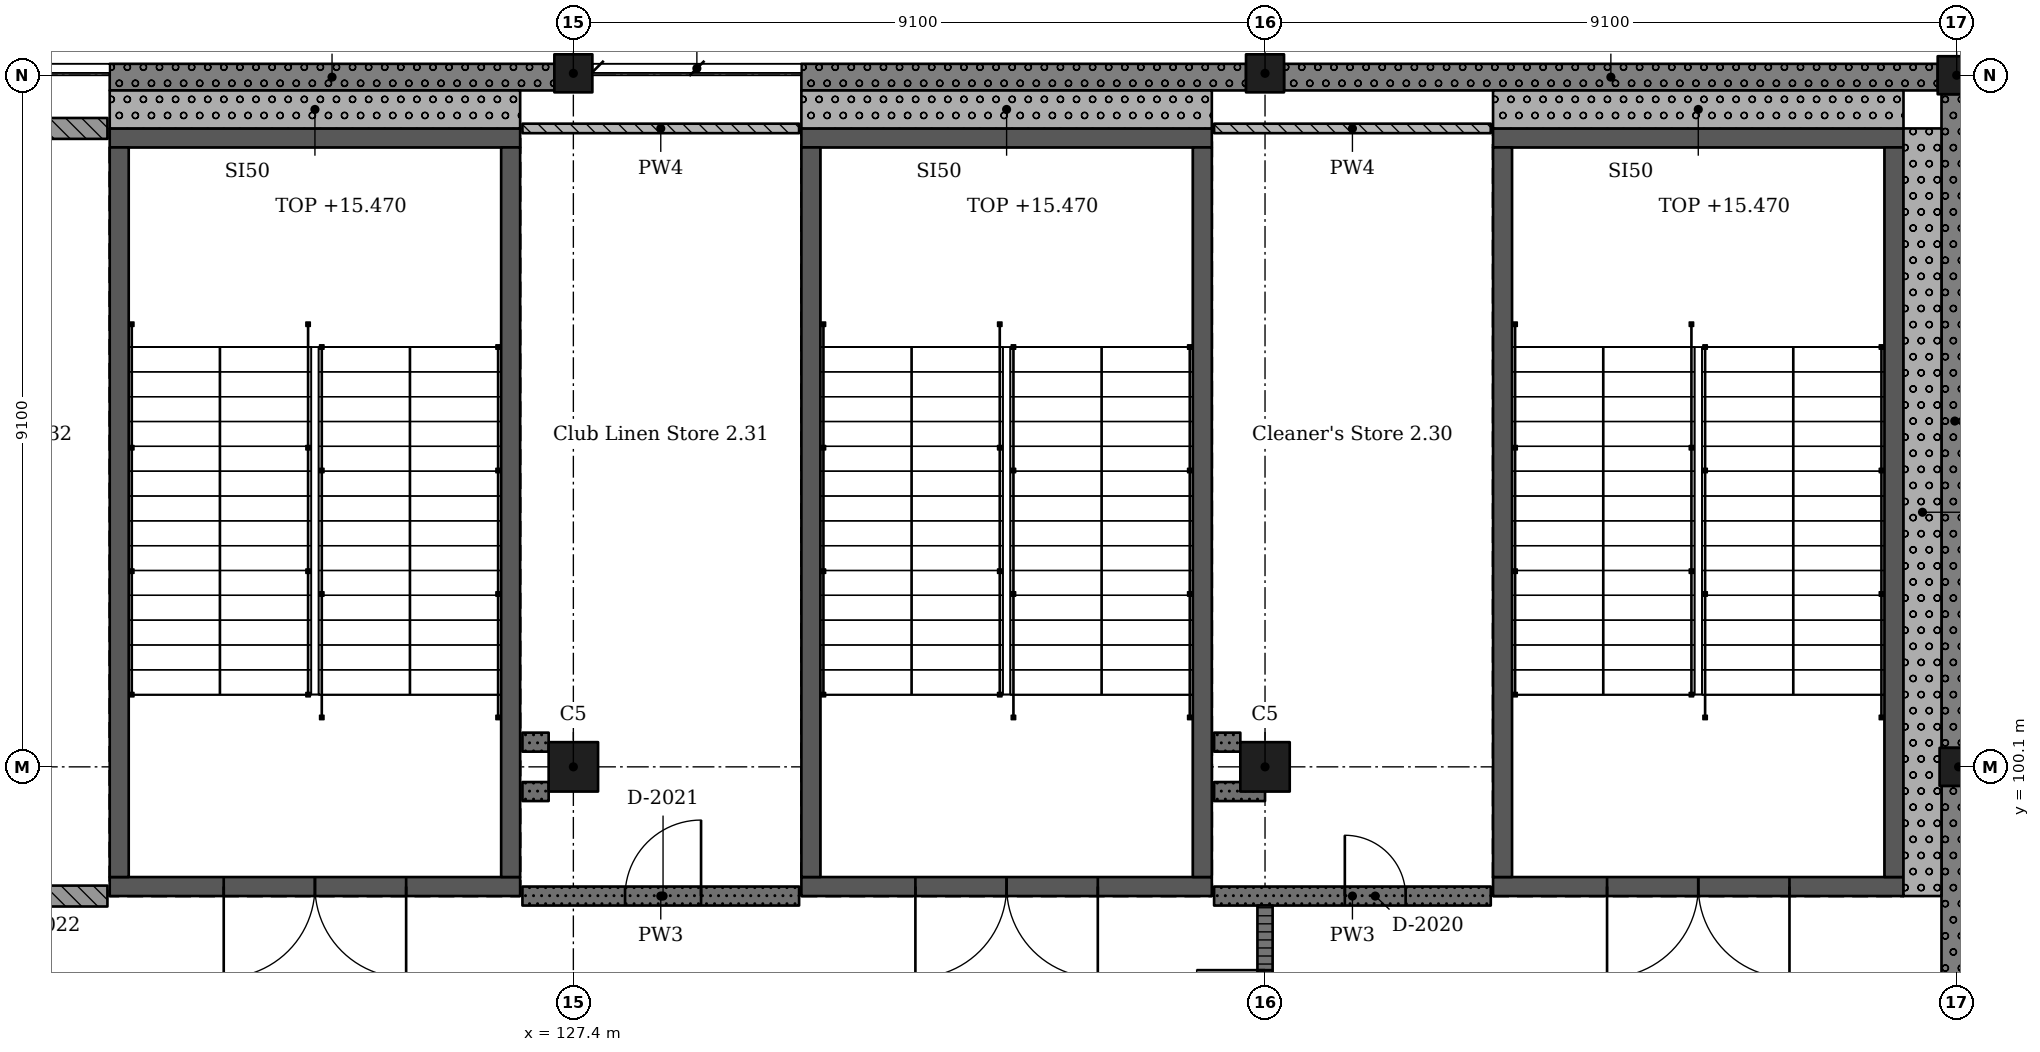
"""IFC4 building model, lengths in metres.
Left out: names, types, materials, properties, quantities, classifications, styles, units other than length and angle.
Written with IfcOpenShell. Run it as: python <this file> out.ifc"""

import sys

from ifc_helpers import new_model, si_unit, direction, frame, frame_2d, origin, origin_2d, place, context, subcontext, project, spatial, rectangle, extrude, element, fill, save


model = new_model("IFC4")
c1 = context("Model", 3, precision=1e-05, world=origin(), true_north=direction((0.0, 1.0)))
c2 = subcontext(c1, "Body", "Model", "MODEL_VIEW")
j1 = project(units=[si_unit("LENGTHUNIT", "METRE"), si_unit("PLANEANGLEUNIT", "RADIAN")], contexts=[c1])
p1 = place(None, origin())
s1 = spatial("IfcSite", under=j1, at=p1, CompositionType="ELEMENT")
p2 = place(p1, origin())
s2 = spatial("IfcBuilding", under=s1, at=p2, CompositionType="ELEMENT")
p3 = place(p2, frame((0.0, 0.0, 10.92)))
s3 = spatial("IfcBuildingStorey", under=s2, at=p3, CompositionType="ELEMENT", Elevation=10.92)
p4 = place(p3, frame((127.4, 100.1, 0.0), z_axis=(0.0, 0.0, 1.0), x_axis=(1.0, 0.0, 0.0)))
e1 = element("IfcColumn", 1, at=p4, inside=s3, PredefinedType="COLUMN", context=c2, shape_type="SweptSolid", body=[
    extrude(rectangle(XDim=0.65, YDim=0.65, at=origin_2d()), origin(), (0.0, 0.0, 1.0), 4.55),
])
p5 = place(p3, frame((127.4, 109.225, 0.0), z_axis=(0.0, 0.0, 1.0), x_axis=(1.0, 0.0, 0.0)))
e2 = element("IfcColumn", 2, at=p5, inside=s3, PredefinedType="COLUMN", context=c2, shape_type="SweptSolid", body=[
    extrude(rectangle(XDim=0.5, YDim=0.5, at=origin_2d()), origin(), (0.0, 0.0, 1.0), 4.55),
])
p6 = place(p3, frame((136.5, 100.1, 0.0), z_axis=(0.0, 0.0, 1.0), x_axis=(1.0, 0.0, 0.0)))
e3 = element("IfcColumn", 3, at=p6, inside=s3, PredefinedType="COLUMN", context=c2, shape_type="SweptSolid", body=[
    extrude(rectangle(XDim=0.65, YDim=0.65, at=origin_2d()), origin(), (0.0, 0.0, 1.0), 4.55),
])
for number, where, z_axis, x_axis in (
    (4, (136.5, 109.225, 0.0), (0.0, 0.0, 1.0), (1.0, 0.0, 0.0)),
    (5, (145.625, 100.1, 0.0), (0.0, 0.0, 1.0), (1.0, 0.0, 0.0)),
    (6, (145.6, 109.2, 0.0), (0.0, 0.0, 1.0), (1.0, 0.0, 0.0)),
):
    element("IfcColumn", number, at=place(p3, frame(where, z_axis=z_axis, x_axis=x_axis)), inside=s3, PredefinedType="COLUMN", context=c2, shape_type="SweptSolid", body=[
        extrude(rectangle(XDim=0.5, YDim=0.5, at=origin_2d()), origin(), (0.0, 0.0, 1.0), 4.55),
    ])
p7 = place(p3, frame((144.9, 98.525, 0.0), z_axis=(0.0, 0.0, 1.0), x_axis=(-1.0, 0.0, 0.0)))
e7 = element("IfcWall", 7, at=p7, inside=s3, PredefinedType="SHEAR", context=c2, shape_type="SweptSolid", body=[
    extrude(rectangle(XDim=5.4, YDim=0.25, at=frame_2d((2.7, 0.0))), origin(), (0.0, 0.0, 1.0), 4.55),
])
p8 = place(p7, frame((1.5, 0.0, 0.0)))
e8 = element("IfcOpeningElement", 8, at=p8, cuts=e7, PredefinedType="OPENING", context=c2, shape_type="SweptSolid", body=[
    extrude(rectangle(XDim=2.4, YDim=2.1, at=frame_2d((1.2, 1.05))), frame((0.0, 0.135, 0.0), z_axis=(0.0, -1.0, 0.0), x_axis=(1.0, 0.0, 0.0)), (0.0, 0.0, 1.0), 0.27),
])
p9 = place(p3, frame((144.9, 108.375, 0.0), z_axis=(0.0, 0.0, 1.0), x_axis=(-1.0, 0.0, 0.0)))
e9 = element("IfcWall", 9, at=p9, inside=s3, PredefinedType="SHEAR", context=c2, shape_type="SweptSolid", body=[
    extrude(rectangle(XDim=5.4, YDim=0.25, at=frame_2d((2.7, 0.0))), origin(), (0.0, 0.0, 1.0), 4.55),
])
for number, where, z_axis, x_axis in (
    (10, (139.625, 108.25, 0.0), (0.0, 0.0, 1.0), (0.0, -1.0, 0.0)),
    (11, (144.775, 108.25, 0.0), (0.0, 0.0, 1.0), (0.0, -1.0, 0.0)),
):
    element("IfcWall", number, at=place(p3, frame(where, z_axis=z_axis, x_axis=x_axis)), inside=s3, PredefinedType="SHEAR", context=c2, shape_type="SweptSolid", body=[
        extrude(rectangle(XDim=9.6, YDim=0.25, at=frame_2d((4.8, 0.0))), origin(), (0.0, 0.0, 1.0), 4.55),
    ])
p10 = place(p3, frame((135.8, 98.525, 0.0), z_axis=(0.0, 0.0, 1.0), x_axis=(-1.0, 0.0, 0.0)))
e12 = element("IfcWall", 12, at=p10, inside=s3, PredefinedType="SHEAR", context=c2, shape_type="SweptSolid", body=[
    extrude(rectangle(XDim=5.4, YDim=0.25, at=frame_2d((2.7, 0.0))), origin(), (0.0, 0.0, 1.0), 4.55),
])
p11 = place(p10, frame((1.5, 0.0, 0.0)))
e13 = element("IfcOpeningElement", 13, at=p11, cuts=e12, PredefinedType="OPENING", context=c2, shape_type="SweptSolid", body=[
    extrude(rectangle(XDim=2.4, YDim=2.1, at=frame_2d((1.2, 1.05))), frame((0.0, 0.135, 0.0), z_axis=(0.0, -1.0, 0.0), x_axis=(1.0, 0.0, 0.0)), (0.0, 0.0, 1.0), 0.27),
])
p12 = place(p3, frame((135.8, 108.375, 0.0), z_axis=(0.0, 0.0, 1.0), x_axis=(-1.0, 0.0, 0.0)))
e14 = element("IfcWall", 14, at=p12, inside=s3, PredefinedType="SHEAR", context=c2, shape_type="SweptSolid", body=[
    extrude(rectangle(XDim=5.4, YDim=0.25, at=frame_2d((2.7, 0.0))), origin(), (0.0, 0.0, 1.0), 4.55),
])
for number, where, z_axis, x_axis in (
    (15, (130.525, 108.25, 0.0), (0.0, 0.0, 1.0), (0.0, -1.0, 0.0)),
    (16, (135.675, 108.25, 0.0), (0.0, 0.0, 1.0), (0.0, -1.0, 0.0)),
):
    element("IfcWall", number, at=place(p3, frame(where, z_axis=z_axis, x_axis=x_axis)), inside=s3, PredefinedType="SHEAR", context=c2, shape_type="SweptSolid", body=[
        extrude(rectangle(XDim=9.6, YDim=0.25, at=frame_2d((4.8, 0.0))), origin(), (0.0, 0.0, 1.0), 4.55),
    ])
p13 = place(p3, frame((126.7, 98.525, 0.0), z_axis=(0.0, 0.0, 1.0), x_axis=(-1.0, 0.0, 0.0)))
e17 = element("IfcWall", 17, at=p13, inside=s3, PredefinedType="SHEAR", context=c2, shape_type="SweptSolid", body=[
    extrude(rectangle(XDim=5.4, YDim=0.25, at=frame_2d((2.7, 0.0))), origin(), (0.0, 0.0, 1.0), 4.55),
])
p14 = place(p13, frame((1.5, 0.0, 0.0)))
e18 = element("IfcOpeningElement", 18, at=p14, cuts=e17, PredefinedType="OPENING", context=c2, shape_type="SweptSolid", body=[
    extrude(rectangle(XDim=2.4, YDim=2.1, at=frame_2d((1.2, 1.05))), frame((0.0, 0.135, 0.0), z_axis=(0.0, -1.0, 0.0), x_axis=(1.0, 0.0, 0.0)), (0.0, 0.0, 1.0), 0.27),
])
p15 = place(p3, frame((126.7, 108.375, 0.0), z_axis=(0.0, 0.0, 1.0), x_axis=(-1.0, 0.0, 0.0)))
e19 = element("IfcWall", 19, at=p15, inside=s3, PredefinedType="SHEAR", context=c2, shape_type="SweptSolid", body=[
    extrude(rectangle(XDim=5.4, YDim=0.25, at=frame_2d((2.7, 0.0))), origin(), (0.0, 0.0, 1.0), 4.55),
])
for number, where, z_axis, x_axis in (
    (20, (121.425, 108.25, 0.0), (0.0, 0.0, 1.0), (0.0, -1.0, 0.0)),
    (21, (126.575, 108.25, 0.0), (0.0, 0.0, 1.0), (0.0, -1.0, 0.0)),
):
    element("IfcWall", number, at=place(p3, frame(where, z_axis=z_axis, x_axis=x_axis)), inside=s3, PredefinedType="SHEAR", context=c2, shape_type="SweptSolid", body=[
        extrude(rectangle(XDim=9.6, YDim=0.25, at=frame_2d((4.8, 0.0))), origin(), (0.0, 0.0, 1.0), 4.55),
    ])
p16 = place(p3, frame((145.575, 91.275, 0.0), z_axis=(0.0, 0.0, 1.0), x_axis=(0.0, 1.0, 0.0)))
e22 = element("IfcWall", 22, at=p16, inside=s3, PredefinedType="SOLIDWALL", context=c2, shape_type="SweptSolid", body=[
    extrude(rectangle(XDim=8.575, YDim=0.35, at=frame_2d((4.288, 0.0))), origin(), (0.0, 0.0, 1.0), 3.5),
])
p17 = place(p3, frame((145.575, 100.35, 0.0), z_axis=(0.0, 0.0, 1.0), x_axis=(0.0, 1.0, 0.0)))
e23 = element("IfcWall", 23, at=p17, inside=s3, PredefinedType="SOLIDWALL", context=c2, shape_type="SweptSolid", body=[
    extrude(rectangle(XDim=8.6, YDim=0.35, at=frame_2d((4.3, 0.0))), origin(), (0.0, 0.0, 1.0), 3.5),
])
p18 = place(p3, frame((145.35, 109.175, 0.0), z_axis=(0.0, 0.0, 1.0), x_axis=(-1.0, 0.0, 0.0)))
e24 = element("IfcWall", 24, at=p18, inside=s3, PredefinedType="SOLIDWALL", context=c2, shape_type="SweptSolid", body=[
    extrude(rectangle(XDim=8.6, YDim=0.35, at=frame_2d((4.3, 0.0))), origin(), (0.0, 0.0, 1.0), 3.5),
])
p19 = place(p3, frame((136.25, 109.175, 0.0), z_axis=(0.0, 0.0, 1.0), x_axis=(-1.0, 0.0, 0.0)))
e25 = element("IfcWall", 25, at=p19, inside=s3, PredefinedType="SOLIDWALL", context=c2, shape_type="SweptSolid", body=[
    extrude(rectangle(XDim=5.85, YDim=0.35, at=frame_2d((2.925, 0.0))), origin(), (0.0, 0.0, 1.0), 3.5),
])
p20 = place(p3, frame((127.15, 109.175, 0.0), z_axis=(0.0, 0.0, 1.0), x_axis=(-1.0, 0.0, 0.0)))
e26 = element("IfcWall", 26, at=p20, inside=s3, PredefinedType="SOLIDWALL", context=c2, shape_type="SweptSolid", body=[
    extrude(rectangle(XDim=5.85, YDim=0.35, at=frame_2d((2.925, 0.0))), origin(), (0.0, 0.0, 1.0), 3.5),
])
p21 = place(p3, frame((139.5, 108.75, 0.0), z_axis=(0.0, 0.0, 1.0), x_axis=(1.0, 0.0, 0.0)))
e27 = element("IfcWall", 27, at=p21, inside=s3, PredefinedType="SOLIDWALL", context=c2, shape_type="SweptSolid", body=[
    extrude(rectangle(XDim=5.4, YDim=0.5, at=frame_2d((2.7, 0.0))), origin(), (0.0, 0.0, 1.0), 4.55),
])
p22 = place(p3, frame((145.15, 98.4, 0.0), z_axis=(0.0, 0.0, 1.0), x_axis=(0.0, 1.0, 0.0)))
e28 = element("IfcWall", 28, at=p22, inside=s3, PredefinedType="SOLIDWALL", context=c2, shape_type="SweptSolid", body=[
    extrude(rectangle(XDim=10.1, YDim=0.5, at=frame_2d((5.05, 0.0))), origin(), (0.0, 0.0, 1.0), 4.55),
])
p23 = place(p3, frame((130.4, 108.75, 0.0), z_axis=(0.0, 0.0, 1.0), x_axis=(1.0, 0.0, 0.0)))
e29 = element("IfcWall", 29, at=p23, inside=s3, PredefinedType="SOLIDWALL", context=c2, shape_type="SweptSolid", body=[
    extrude(rectangle(XDim=5.4, YDim=0.5, at=frame_2d((2.7, 0.0))), origin(), (0.0, 0.0, 1.0), 4.55),
])
p24 = place(p3, frame((121.3, 108.75, 0.0), z_axis=(0.0, 0.0, 1.0), x_axis=(1.0, 0.0, 0.0)))
e30 = element("IfcWall", 30, at=p24, inside=s3, PredefinedType="SOLIDWALL", context=c2, shape_type="SweptSolid", body=[
    extrude(rectangle(XDim=5.4, YDim=0.5, at=frame_2d((2.7, 0.0))), origin(), (0.0, 0.0, 1.0), 4.55),
])
p25 = place(p3, frame((117.63, 98.4, 0.0), z_axis=(0.0, 0.0, 1.0), x_axis=(1.0, 0.0, 0.0)))
e31 = element("IfcWall", 31, at=p25, inside=s3, PredefinedType="SOLIDWALL", context=c2, shape_type="SweptSolid", body=[
    extrude(rectangle(XDim=3.64, YDim=0.275, at=frame_2d((1.82, 0.0))), origin(), (0.0, 0.0, 1.0), 4.25),
])
p26 = place(p25, frame((1.52, 0.0, 0.0)))
e32 = element("IfcOpeningElement", 32, at=p26, cuts=e31, PredefinedType="OPENING", context=c2, shape_type="SweptSolid", body=[
    extrude(rectangle(XDim=1.2, YDim=2.4, at=frame_2d((0.6, 1.2))), frame((0.0, 0.147, 0.0), z_axis=(0.0, -1.0, 0.0), x_axis=(1.0, 0.0, 0.0)), (0.0, 0.0, 1.0), 0.295),
])
p27 = place(p3, frame((117.63, 108.5, 0.0), z_axis=(0.0, 0.0, 1.0), x_axis=(1.0, 0.0, 0.0)))
e33 = element("IfcWall", 33, at=p27, inside=s3, PredefinedType="SOLIDWALL", context=c2, shape_type="SweptSolid", body=[
    extrude(rectangle(XDim=3.64, YDim=0.275, at=frame_2d((1.82, 0.0))), origin(), (0.0, 0.0, 1.0), 4.25),
])
p28 = place(p3, frame((126.73, 98.4, 0.0), z_axis=(0.0, 0.0, 1.0), x_axis=(1.0, 0.0, 0.0)))
e34 = element("IfcWall", 34, at=p28, inside=s3, PredefinedType="SOLIDWALL", context=c2, shape_type="SweptSolid", body=[
    extrude(rectangle(XDim=3.64, YDim=0.25, at=frame_2d((1.82, 0.0))), origin(), (0.0, 0.0, 1.0), 4.25),
])
p29 = place(p28, frame((1.35, 0.0, 0.0)))
e35 = element("IfcOpeningElement", 35, at=p29, cuts=e34, PredefinedType="OPENING", context=c2, shape_type="SweptSolid", body=[
    extrude(rectangle(XDim=1.0, YDim=2.1, at=frame_2d((0.5, 1.05))), frame((0.0, 0.135, 0.0), z_axis=(0.0, -1.0, 0.0), x_axis=(1.0, 0.0, 0.0)), (0.0, 0.0, 1.0), 0.27),
])
p30 = place(p3, frame((126.73, 99.775, 0.0), z_axis=(0.0, 0.0, 1.0), x_axis=(1.0, 0.0, 0.0)))
e36 = element("IfcWall", 36, at=p30, inside=s3, PredefinedType="SOLIDWALL", context=c2, shape_type="SweptSolid", body=[
    extrude(rectangle(XDim=0.345, YDim=0.25, at=frame_2d((0.172, 0.0))), origin(), (0.0, 0.0, 1.0), 4.25),
])
p31 = place(p3, frame((126.73, 108.5, 0.0), z_axis=(0.0, 0.0, 1.0), x_axis=(1.0, 0.0, 0.0)))
e37 = element("IfcWall", 37, at=p31, inside=s3, PredefinedType="PARTITIONING", context=c2, shape_type="SweptSolid", body=[
    extrude(rectangle(XDim=3.64, YDim=0.125, at=frame_2d((1.82, 0.0))), origin(), (0.0, 0.0, 1.0), 4.25),
])
p32 = place(p3, frame((127.075, 100.425, 0.0), z_axis=(0.0, 0.0, 1.0), x_axis=(-1.0, 0.0, 0.0)))
e38 = element("IfcWall", 38, at=p32, inside=s3, PredefinedType="SOLIDWALL", context=c2, shape_type="SweptSolid", body=[
    extrude(rectangle(XDim=0.345, YDim=0.25, at=frame_2d((0.172, 0.0))), origin(), (0.0, 0.0, 1.0), 4.25),
])
p33 = place(p3, frame((135.83, 98.4, 0.0), z_axis=(0.0, 0.0, 1.0), x_axis=(1.0, 0.0, 0.0)))
e39 = element("IfcWall", 39, at=p33, inside=s3, PredefinedType="SOLIDWALL", context=c2, shape_type="SweptSolid", body=[
    extrude(rectangle(XDim=3.64, YDim=0.25, at=frame_2d((1.82, 0.0))), origin(), (0.0, 0.0, 1.0), 4.25),
])
p34 = place(p33, frame((1.72, 0.0, 0.0)))
e40 = element("IfcOpeningElement", 40, at=p34, cuts=e39, PredefinedType="OPENING", context=c2, shape_type="SweptSolid", body=[
    extrude(rectangle(XDim=0.8, YDim=2.1, at=frame_2d((0.4, 1.05))), frame((0.0, 0.135, 0.0), z_axis=(0.0, -1.0, 0.0), x_axis=(1.0, 0.0, 0.0)), (0.0, 0.0, 1.0), 0.27),
])
p35 = place(p3, frame((135.83, 99.775, 0.0), z_axis=(0.0, 0.0, 1.0), x_axis=(1.0, 0.0, 0.0)))
e41 = element("IfcWall", 41, at=p35, inside=s3, PredefinedType="SOLIDWALL", context=c2, shape_type="SweptSolid", body=[
    extrude(rectangle(XDim=0.67, YDim=0.25, at=frame_2d((0.335, 0.0))), origin(), (0.0, 0.0, 1.0), 4.25),
])
p36 = place(p3, frame((135.83, 108.5, 0.0), z_axis=(0.0, 0.0, 1.0), x_axis=(1.0, 0.0, 0.0)))
e42 = element("IfcWall", 42, at=p36, inside=s3, PredefinedType="PARTITIONING", context=c2, shape_type="SweptSolid", body=[
    extrude(rectangle(XDim=3.64, YDim=0.125, at=frame_2d((1.82, 0.0))), origin(), (0.0, 0.0, 1.0), 4.25),
])
p37 = place(p3, frame((136.175, 100.425, 0.0), z_axis=(0.0, 0.0, 1.0), x_axis=(-1.0, 0.0, 0.0)))
e43 = element("IfcWall", 43, at=p37, inside=s3, PredefinedType="SOLIDWALL", context=c2, shape_type="SweptSolid", body=[
    extrude(rectangle(XDim=0.345, YDim=0.25, at=frame_2d((0.172, 0.0))), origin(), (0.0, 0.0, 1.0), 4.25),
])
p38 = place(p3, frame((136.5, 91.375, 0.0), z_axis=(0.0, 0.0, 1.0), x_axis=(0.0, 1.0, 0.0)))
e44 = element("IfcWall", 44, at=p38, inside=s3, PredefinedType="PARTITIONING", context=c2, shape_type="SweptSolid", body=[
    extrude(rectangle(XDim=6.9, YDim=0.2, at=frame_2d((3.45, 0.0))), origin(), (0.0, 0.0, 1.0), 3.55),
])
p39 = place(p38, frame((0.85, 0.0, 0.0)))
e45 = element("IfcOpeningElement", 45, at=p39, cuts=e44, PredefinedType="OPENING", context=c2, shape_type="SweptSolid", body=[
    extrude(rectangle(XDim=1.8, YDim=2.4, at=frame_2d((0.9, 1.2))), frame((0.0, 0.11, 0.0), z_axis=(0.0, -1.0, 0.0), x_axis=(1.0, 0.0, 0.0)), (0.0, 0.0, 1.0), 0.22),
])
p40 = place(p38, frame((4.25, 0.0, 0.0)))
e46 = element("IfcOpeningElement", 46, at=p40, cuts=e44, PredefinedType="OPENING", context=c2, shape_type="SweptSolid", body=[
    extrude(rectangle(XDim=1.8, YDim=2.4, at=frame_2d((0.9, 1.2))), frame((0.0, 0.11, 0.0), z_axis=(0.0, -1.0, 0.0), x_axis=(1.0, 0.0, 0.0)), (0.0, 0.0, 1.0), 0.22),
])
p41 = place(p34, origin())
e47 = element("IfcDoor", 47, at=p41, inside=s3, OperationType="SINGLE_SWING_RIGHT", PredefinedType="DOOR", context=c2, shape_type="SweptSolid", body=[
    extrude(rectangle(XDim=0.8, YDim=2.1, at=frame_2d((0.4, 1.05))), frame((0.0, 0.025, 0.0), z_axis=(0.0, -1.0, 0.0), x_axis=(1.0, 0.0, 0.0)), (0.0, 0.0, 1.0), 0.05),
])
fill(e40, e47)
p42 = place(p29, origin())
e48 = element("IfcDoor", 48, at=p42, inside=s3, OperationType="SINGLE_SWING_LEFT", PredefinedType="DOOR", context=c2, shape_type="SweptSolid", body=[
    extrude(rectangle(XDim=1.0, YDim=2.1, at=frame_2d((0.5, 1.05))), frame((0.0, 0.025, 0.0), z_axis=(0.0, -1.0, 0.0), x_axis=(1.0, 0.0, 0.0)), (0.0, 0.0, 1.0), 0.05),
])
fill(e35, e48)
p43 = place(p40, origin())
e49 = element("IfcDoor", 49, at=p43, inside=s3, OperationType="DOUBLE_DOOR_SINGLE_SWING", PredefinedType="DOOR", context=c2, shape_type="SweptSolid", body=[
    extrude(rectangle(XDim=1.8, YDim=2.4, at=frame_2d((0.9, 1.2))), frame((0.0, 0.025, 0.0), z_axis=(0.0, -1.0, 0.0), x_axis=(1.0, 0.0, 0.0)), (0.0, 0.0, 1.0), 0.05),
])
fill(e46, e49)
p44 = place(p8, origin())
e50 = element("IfcDoor", 50, at=p44, inside=s3, OperationType="DOUBLE_DOOR_SINGLE_SWING", PredefinedType="DOOR", context=c2, shape_type="SweptSolid", body=[
    extrude(rectangle(XDim=2.4, YDim=2.1, at=frame_2d((1.2, 1.05))), frame((0.0, 0.025, 0.0), z_axis=(0.0, -1.0, 0.0), x_axis=(1.0, 0.0, 0.0)), (0.0, 0.0, 1.0), 0.05),
])
fill(e8, e50)
p45 = place(p11, origin())
e51 = element("IfcDoor", 51, at=p45, inside=s3, OperationType="DOUBLE_DOOR_SINGLE_SWING", PredefinedType="DOOR", context=c2, shape_type="SweptSolid", body=[
    extrude(rectangle(XDim=2.4, YDim=2.1, at=frame_2d((1.2, 1.05))), frame((0.0, 0.025, 0.0), z_axis=(0.0, -1.0, 0.0), x_axis=(1.0, 0.0, 0.0)), (0.0, 0.0, 1.0), 0.05),
])
fill(e13, e51)
p46 = place(p14, origin())
e52 = element("IfcDoor", 52, at=p46, inside=s3, OperationType="DOUBLE_DOOR_SINGLE_SWING", PredefinedType="DOOR", context=c2, shape_type="SweptSolid", body=[
    extrude(rectangle(XDim=2.4, YDim=2.1, at=frame_2d((1.2, 1.05))), frame((0.0, 0.025, 0.0), z_axis=(0.0, -1.0, 0.0), x_axis=(1.0, 0.0, 0.0)), (0.0, 0.0, 1.0), 0.05),
])
fill(e18, e52)
save(model, sys.argv[1])
